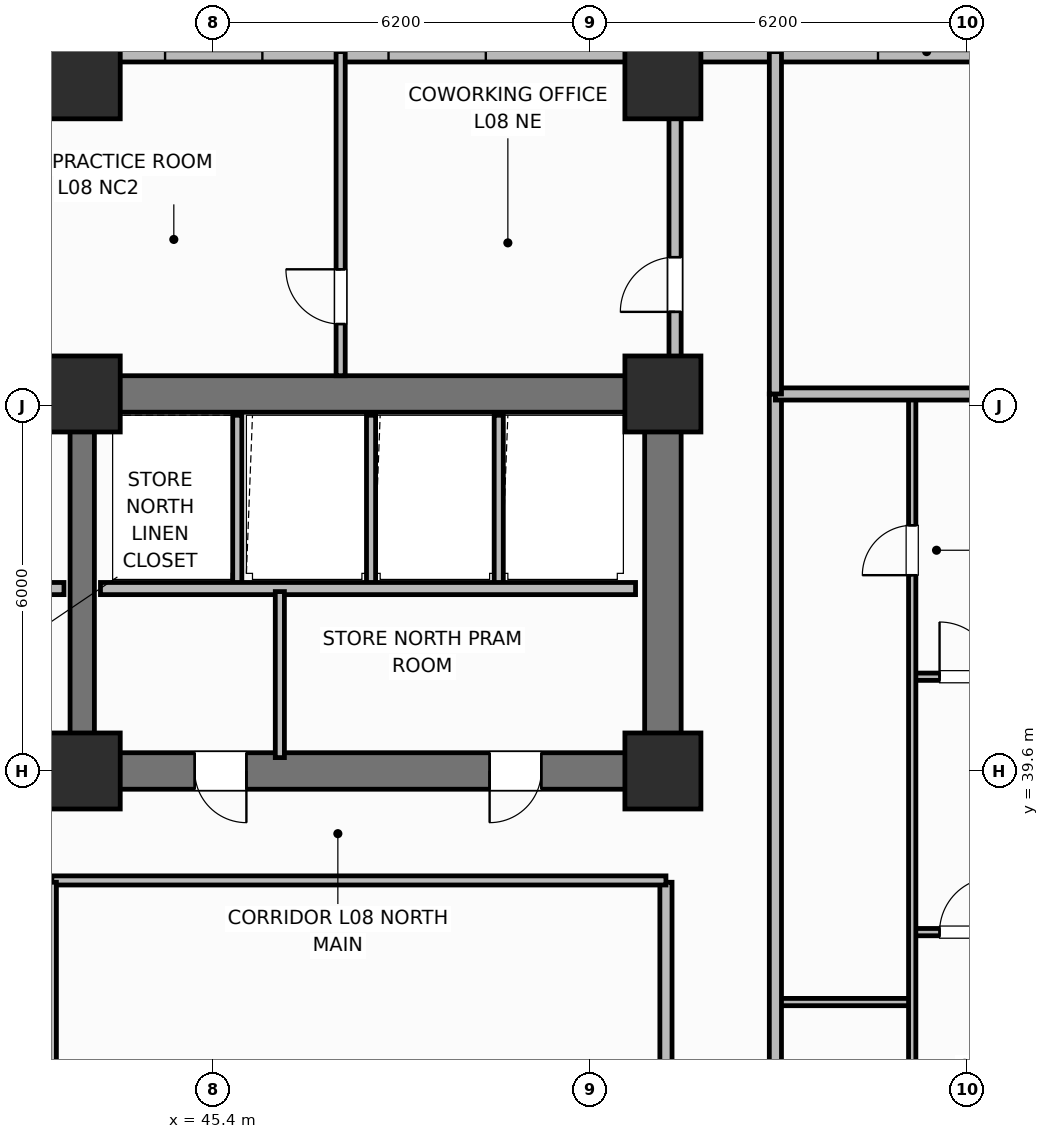
"""IFC4 building model, lengths in metres.
Left out: names, types, materials, properties, quantities, classifications, styles, units other than length and angle.
Written with IfcOpenShell. Run it as: python <this file> out.ifc"""

import sys

from ifc_helpers import new_model, si_unit, direction, frame, frame_2d, origin, origin_2d, place, context, subcontext, project, spatial, rectangle, extrude, element, fill, save


model = new_model("IFC4")
c1 = context("Model", 3, precision=1e-05, world=origin(), true_north=direction((0.0, 1.0)))
c2 = subcontext(c1, "Body", "Model", "MODEL_VIEW")
j1 = project(units=[si_unit("LENGTHUNIT", "METRE"), si_unit("PLANEANGLEUNIT", "RADIAN")], contexts=[c1])
p1 = place(None, origin())
s1 = spatial("IfcSite", under=j1, at=p1, CompositionType="ELEMENT")
p2 = place(p1, origin())
s2 = spatial("IfcBuilding", under=s1, at=p2, CompositionType="ELEMENT")
p3 = place(p2, frame((0.0, 0.0, 36.2)))
s3 = spatial("IfcBuildingStorey", under=s2, at=p3, CompositionType="ELEMENT", Elevation=36.2)
p4 = place(p3, frame((25.6, 45.8, 0.0), z_axis=(0.0, 0.0, 1.0), x_axis=(1.0, 0.0, 0.0)))
e1 = element("IfcWall", 1, at=p4, inside=s3, PredefinedType="SHEAR", context=c2, shape_type="SweptSolid", body=[
    extrude(rectangle(XDim=27.2, YDim=0.6, at=frame_2d((13.6, 0.0))), origin(), (0.0, 0.0, 1.0), 3.7),
])
p5 = place(p3, frame((52.8, 39.9, 0.0), z_axis=(0.0, 0.0, 1.0), x_axis=(0.0, 1.0, 0.0)))
e2 = element("IfcWall", 2, at=p5, inside=s3, PredefinedType="SHEAR", context=c2, shape_type="SweptSolid", body=[
    extrude(rectangle(XDim=5.6, YDim=0.6, at=frame_2d((2.8, 0.0))), origin(), (0.0, 0.0, 1.0), 3.7),
])
p6 = place(p3, frame((52.8, 39.6, 0.0), z_axis=(0.0, 0.0, 1.0), x_axis=(-1.0, 0.0, 0.0)))
e3 = element("IfcWall", 3, at=p6, inside=s3, PredefinedType="SHEAR", context=c2, shape_type="SweptSolid", body=[
    extrude(rectangle(XDim=27.2, YDim=0.6, at=frame_2d((13.6, 0.0))), origin(), (0.0, 0.0, 1.0), 3.7),
])
p7 = place(p6, frame((24.3, 0.0, 0.0)))
e4 = element("IfcOpeningElement", 4, at=p7, cuts=e3, PredefinedType="OPENING", context=c2, shape_type="SweptSolid", body=[
    extrude(rectangle(XDim=1.1, YDim=2.15, at=frame_2d((0.55, 1.075))), frame((0.0, 0.31, 0.0), z_axis=(0.0, -1.0, 0.0), x_axis=(1.0, 0.0, 0.0)), (0.0, 0.0, 1.0), 0.62),
])
p8 = place(p6, frame((21.85, 0.0, 0.0)))
e5 = element("IfcOpeningElement", 5, at=p8, cuts=e3, PredefinedType="OPENING", context=c2, shape_type="SweptSolid", body=[
    extrude(rectangle(XDim=0.85, YDim=2.1, at=frame_2d((0.425, 1.05))), frame((0.0, 0.31, 0.0), z_axis=(0.0, -1.0, 0.0), x_axis=(1.0, 0.0, 0.0)), (0.0, 0.0, 1.0), 0.62),
])
p9 = place(p6, frame((19.85, 0.0, 0.0)))
e6 = element("IfcOpeningElement", 6, at=p9, cuts=e3, PredefinedType="OPENING", context=c2, shape_type="SweptSolid", body=[
    extrude(rectangle(XDim=0.85, YDim=2.1, at=frame_2d((0.425, 1.05))), frame((0.0, 0.31, 0.0), z_axis=(0.0, -1.0, 0.0), x_axis=(1.0, 0.0, 0.0)), (0.0, 0.0, 1.0), 0.62),
])
p10 = place(p6, frame((15.1, 0.0, 0.0)))
e7 = element("IfcOpeningElement", 7, at=p10, cuts=e3, PredefinedType="OPENING", context=c2, shape_type="SweptSolid", body=[
    extrude(rectangle(XDim=1.2, YDim=2.15, at=frame_2d((0.6, 1.075))), frame((0.0, 0.31, 0.0), z_axis=(0.0, -1.0, 0.0), x_axis=(1.0, 0.0, 0.0)), (0.0, 0.0, 1.0), 0.62),
])
p11 = place(p6, frame((12.6, 0.0, 0.0)))
e8 = element("IfcOpeningElement", 8, at=p11, cuts=e3, PredefinedType="OPENING", context=c2, shape_type="SweptSolid", body=[
    extrude(rectangle(XDim=0.85, YDim=2.1, at=frame_2d((0.425, 1.05))), frame((0.0, 0.31, 0.0), z_axis=(0.0, -1.0, 0.0), x_axis=(1.0, 0.0, 0.0)), (0.0, 0.0, 1.0), 0.62),
])
p12 = place(p6, frame((10.85, 0.0, 0.0)))
e9 = element("IfcOpeningElement", 9, at=p12, cuts=e3, PredefinedType="OPENING", context=c2, shape_type="SweptSolid", body=[
    extrude(rectangle(XDim=0.85, YDim=2.1, at=frame_2d((0.425, 1.05))), frame((0.0, 0.31, 0.0), z_axis=(0.0, -1.0, 0.0), x_axis=(1.0, 0.0, 0.0)), (0.0, 0.0, 1.0), 0.62),
])
p13 = place(p6, frame((6.85, 0.0, 0.0)))
e10 = element("IfcOpeningElement", 10, at=p13, cuts=e3, PredefinedType="OPENING", context=c2, shape_type="SweptSolid", body=[
    extrude(rectangle(XDim=0.85, YDim=2.1, at=frame_2d((0.425, 1.05))), frame((0.0, 0.31, 0.0), z_axis=(0.0, -1.0, 0.0), x_axis=(1.0, 0.0, 0.0)), (0.0, 0.0, 1.0), 0.62),
])
p14 = place(p6, frame((2.0, 0.0, 0.0)))
e11 = element("IfcOpeningElement", 11, at=p14, cuts=e3, PredefinedType="OPENING", context=c2, shape_type="SweptSolid", body=[
    extrude(rectangle(XDim=0.85, YDim=2.1, at=frame_2d((0.425, 1.05))), frame((0.0, 0.31, 0.0), z_axis=(0.0, -1.0, 0.0), x_axis=(1.0, 0.0, 0.0)), (0.0, 0.0, 1.0), 0.62),
])
p15 = place(p3, frame((43.25, 39.9, 0.0), z_axis=(0.0, 0.0, 1.0), x_axis=(0.0, 1.0, 0.0)))
e12 = element("IfcWall", 12, at=p15, inside=s3, PredefinedType="SHEAR", context=c2, shape_type="SweptSolid", body=[
    extrude(rectangle(XDim=5.6, YDim=0.4, at=frame_2d((2.8, 0.0))), origin(), (0.0, 0.0, 1.0), 3.7),
])
for number, where, z_axis, x_axis in (
    (13, (43.25, 39.6, 0.0), (0.0, 0.0, 1.0), (1.0, 0.0, 0.0)),
    (14, (43.25, 45.8, 0.0), (0.0, 0.0, 1.0), (1.0, 0.0, 0.0)),
    (15, (52.8, 39.6, 0.0), (0.0, 0.0, 1.0), (1.0, 0.0, 0.0)),
    (16, (52.8, 45.8, 0.0), (0.0, 0.0, 1.0), (1.0, 0.0, 0.0)),
    (17, (43.25, 50.95, 0.0), (0.0, 0.0, 1.0), (1.0, 0.0, 0.0)),
    (18, (52.8, 50.95, 0.0), (0.0, 0.0, 1.0), (1.0, 0.0, 0.0)),
):
    element("IfcColumn", number, at=place(p3, frame(where, z_axis=z_axis, x_axis=x_axis)), inside=s3, PredefinedType="COLUMN", context=c2, shape_type="SweptSolid", body=[
        extrude(rectangle(XDim=1.25, YDim=1.25, at=origin_2d()), origin(), (0.0, 0.0, 1.0), 3.7),
    ])
p16 = place(p3, frame((59.8, 51.43, 0.0), z_axis=(0.0, 0.0, 1.0), x_axis=(-1.0, 0.0, 0.0)))
e19 = element("IfcWall", 19, at=p16, inside=s3, PredefinedType="SOLIDWALL", context=c2, shape_type="SweptSolid", body=[
    extrude(rectangle(XDim=17.4, YDim=0.34, at=frame_2d((8.7, 0.0))), origin(), (0.0, 0.0, 1.0), 2.7),
])
p17 = place(p16, frame((1.863, 0.0, 0.68)))
e20 = element("IfcOpeningElement", 20, at=p17, cuts=e19, PredefinedType="OPENING", context=c2, shape_type="SweptSolid", body=[
    extrude(rectangle(XDim=1.6, YDim=1.9, at=frame_2d((0.8, 0.95))), frame((0.0, 0.18, 0.0), z_axis=(0.0, -1.0, 0.0), x_axis=(1.0, 0.0, 0.0)), (0.0, 0.0, 1.0), 0.36),
])
p18 = place(p16, frame((9.913, 0.0, 0.68)))
e21 = element("IfcOpeningElement", 21, at=p18, cuts=e19, PredefinedType="OPENING", context=c2, shape_type="SweptSolid", body=[
    extrude(rectangle(XDim=1.6, YDim=1.9, at=frame_2d((0.8, 0.95))), frame((0.0, 0.18, 0.0), z_axis=(0.0, -1.0, 0.0), x_axis=(1.0, 0.0, 0.0)), (0.0, 0.0, 1.0), 0.36),
])
p19 = place(p16, frame((13.587, 0.0, 0.68)))
e22 = element("IfcOpeningElement", 22, at=p19, cuts=e19, PredefinedType="OPENING", context=c2, shape_type="SweptSolid", body=[
    extrude(rectangle(XDim=1.6, YDim=1.9, at=frame_2d((0.8, 0.95))), frame((0.0, 0.18, 0.0), z_axis=(0.0, -1.0, 0.0), x_axis=(1.0, 0.0, 0.0)), (0.0, 0.0, 1.0), 0.36),
])
p20 = place(p3, frame((42.95, 42.6, 0.0), z_axis=(0.0, 0.0, 1.0), x_axis=(-1.0, 0.0, 0.0)))
e23 = element("IfcWall", 23, at=p20, inside=s3, PredefinedType="PARTITIONING", context=c2, shape_type="SweptSolid", body=[
    extrude(rectangle(XDim=4.6, YDim=0.2, at=frame_2d((2.3, 0.0))), origin(), (0.0, 0.0, 1.0), 2.3),
])
for number, where, z_axis, x_axis in (
    (24, (45.8, 42.65, 0.0), (0.0, 0.0, 1.0), (0.0, 1.0, 0.0)),
    (25, (48.0, 42.65, 0.0), (0.0, 0.0, 1.0), (0.0, 1.0, 0.0)),
    (26, (50.1, 42.65, 0.0), (0.0, 0.0, 1.0), (0.0, 1.0, 0.0)),
):
    element("IfcWall", number, at=place(p3, frame(where, z_axis=z_axis, x_axis=x_axis)), inside=s3, PredefinedType="PARTITIONING", context=c2, shape_type="SweptSolid", body=[
        extrude(rectangle(XDim=2.8, YDim=0.15, at=frame_2d((1.4, 0.0))), origin(), (0.0, 0.0, 1.0), 2.53),
    ])
p21 = place(p3, frame((52.35, 42.6, 0.0), z_axis=(0.0, 0.0, 1.0), x_axis=(-1.0, 0.0, 0.0)))
e27 = element("IfcWall", 27, at=p21, inside=s3, PredefinedType="PARTITIONING", context=c2, shape_type="SweptSolid", body=[
    extrude(rectangle(XDim=8.8, YDim=0.2, at=frame_2d((4.4, 0.0))), origin(), (0.0, 0.0, 1.0), 2.53),
])
p22 = place(p3, frame((46.5, 39.82, 0.0), z_axis=(0.0, 0.0, 1.0), x_axis=(0.0, 1.0, 0.0)))
e28 = element("IfcWall", 28, at=p22, inside=s3, PredefinedType="PARTITIONING", context=c2, shape_type="SweptSolid", body=[
    extrude(rectangle(XDim=2.73, YDim=0.15, at=frame_2d((1.365, 0.0))), origin(), (0.0, 0.0, 1.0), 2.53),
])
p23 = place(p3, frame((52.85, 18.63, 0.0), z_axis=(0.0, 0.0, 1.0), x_axis=(0.0, 1.0, 0.0)))
e29 = element("IfcWall", 29, at=p23, inside=s3, PredefinedType="PARTITIONING", context=c2, shape_type="SweptSolid", body=[
    extrude(rectangle(XDim=19.14, YDim=0.2, at=frame_2d((9.57, 0.0))), origin(), (0.0, 0.0, 1.0), 2.53),
])
p24 = place(p3, frame((42.75, 37.8, 0.0), z_axis=(0.0, 0.0, 1.0), x_axis=(1.0, 0.0, 0.0)))
e30 = element("IfcWall", 30, at=p24, inside=s3, PredefinedType="PARTITIONING", context=c2, shape_type="SweptSolid", body=[
    extrude(rectangle(XDim=10.1, YDim=0.15, at=frame_2d((5.05, 0.0))), origin(), (0.0, 0.0, 1.0), 2.53),
])
p25 = place(p3, frame((42.75, 18.63, 0.0), z_axis=(0.0, 0.0, 1.0), x_axis=(0.0, 1.0, 0.0)))
e31 = element("IfcWall", 31, at=p25, inside=s3, PredefinedType="PARTITIONING", context=c2, shape_type="SweptSolid", body=[
    extrude(rectangle(XDim=19.14, YDim=0.15, at=frame_2d((9.57, 0.0))), origin(), (0.0, 0.0, 1.0), 2.53),
])
p26 = place(p25, frame((5.5, 0.0, 0.0)))
e32 = element("IfcOpeningElement", 32, at=p26, cuts=e31, PredefinedType="OPENING", context=c2, shape_type="SweptSolid", body=[
    extrude(rectangle(XDim=1.0, YDim=2.15, at=frame_2d((0.5, 1.075))), frame((0.0, 0.085, 0.0), z_axis=(0.0, -1.0, 0.0), x_axis=(1.0, 0.0, 0.0)), (0.0, 0.0, 1.0), 0.17),
])
p27 = place(p3, frame((54.65, 35.8, 0.0), z_axis=(0.0, 0.0, 1.0), x_axis=(1.0, 0.0, 0.0)))
e33 = element("IfcWall", 33, at=p27, inside=s3, PredefinedType="PARTITIONING", context=c2, shape_type="SweptSolid", body=[
    extrude(rectangle(XDim=2.25, YDim=0.12, at=frame_2d((1.125, 0.0))), origin(), (0.0, 0.0, 1.0), 2.53),
])
p28 = place(p3, frame((56.9, 36.95, 0.0), z_axis=(0.0, 0.0, 1.0), x_axis=(1.0, 0.0, 0.0)))
e34 = element("IfcWall", 34, at=p28, inside=s3, PredefinedType="PARTITIONING", context=c2, shape_type="SweptSolid", body=[
    extrude(rectangle(XDim=6.93, YDim=0.12, at=frame_2d((3.465, 0.0))), origin(), (0.0, 0.0, 1.0), 2.53),
])
p29 = place(p28, frame((0.45, 0.0, 0.0)))
e35 = element("IfcOpeningElement", 35, at=p29, cuts=e34, PredefinedType="OPENING", context=c2, shape_type="SweptSolid", body=[
    extrude(rectangle(XDim=0.9, YDim=2.1, at=frame_2d((0.45, 1.05))), frame((0.0, 0.07, 0.0), z_axis=(0.0, -1.0, 0.0), x_axis=(1.0, 0.0, 0.0)), (0.0, 0.0, 1.0), 0.14),
])
p30 = place(p3, frame((56.9, 41.15, 0.0), z_axis=(0.0, 0.0, 1.0), x_axis=(1.0, 0.0, 0.0)))
e36 = element("IfcWall", 36, at=p30, inside=s3, PredefinedType="PARTITIONING", context=c2, shape_type="SweptSolid", body=[
    extrude(rectangle(XDim=6.93, YDim=0.12, at=frame_2d((3.465, 0.0))), origin(), (0.0, 0.0, 1.0), 2.53),
])
p31 = place(p30, frame((0.45, 0.0, 0.0)))
e37 = element("IfcOpeningElement", 37, at=p31, cuts=e36, PredefinedType="OPENING", context=c2, shape_type="SweptSolid", body=[
    extrude(rectangle(XDim=0.9, YDim=2.1, at=frame_2d((0.45, 1.05))), frame((0.0, 0.07, 0.0), z_axis=(0.0, -1.0, 0.0), x_axis=(1.0, 0.0, 0.0)), (0.0, 0.0, 1.0), 0.14),
])
p32 = place(p3, frame((56.9, 26.64, 0.0), z_axis=(0.0, 0.0, 1.0), x_axis=(0.0, 1.0, 0.0)))
e38 = element("IfcWall", 38, at=p32, inside=s3, PredefinedType="PARTITIONING", context=c2, shape_type="SweptSolid", body=[
    extrude(rectangle(XDim=19.12, YDim=0.12, at=frame_2d((9.56, 0.0))), origin(), (0.0, 0.0, 1.0), 2.53),
])
p33 = place(p32, frame((2.81, 0.0, 0.0)))
e39 = element("IfcOpeningElement", 39, at=p33, cuts=e38, PredefinedType="OPENING", context=c2, shape_type="SweptSolid", body=[
    extrude(rectangle(XDim=0.9, YDim=2.1, at=frame_2d((0.45, 1.05))), frame((0.0, 0.07, 0.0), z_axis=(0.0, -1.0, 0.0), x_axis=(1.0, 0.0, 0.0)), (0.0, 0.0, 1.0), 0.14),
])
p34 = place(p32, frame((16.18, 0.0, 0.0)))
e40 = element("IfcOpeningElement", 40, at=p34, cuts=e38, PredefinedType="OPENING", context=c2, shape_type="SweptSolid", body=[
    extrude(rectangle(XDim=0.82, YDim=2.08, at=frame_2d((0.41, 1.04))), frame((0.0, 0.07, 0.0), z_axis=(0.0, -1.0, 0.0), x_axis=(1.0, 0.0, 0.0)), (0.0, 0.0, 1.0), 0.14),
])
p35 = place(p3, frame((54.65, 10.6, 0.0), z_axis=(0.0, 0.0, 1.0), x_axis=(0.0, 1.0, 0.0)))
e41 = element("IfcWall", 41, at=p35, inside=s3, PredefinedType="PARTITIONING", context=c2, shape_type="SweptSolid", body=[
    extrude(rectangle(XDim=35.2, YDim=0.2, at=frame_2d((17.6, 0.0))), origin(), (0.0, 0.0, 1.0), 2.53),
])
p36 = place(p35, frame((2.65, 0.0, 0.0)))
e42 = element("IfcOpeningElement", 42, at=p36, cuts=e41, PredefinedType="OPENING", context=c2, shape_type="SweptSolid", body=[
    extrude(rectangle(XDim=1.0, YDim=2.15, at=frame_2d((0.5, 1.075))), frame((0.0, 0.11, 0.0), z_axis=(0.0, -1.0, 0.0), x_axis=(1.0, 0.0, 0.0)), (0.0, 0.0, 1.0), 0.22),
])
p37 = place(p35, frame((19.95, 0.0, 0.0)))
e43 = element("IfcOpeningElement", 43, at=p37, cuts=e41, PredefinedType="OPENING", context=c2, shape_type="SweptSolid", body=[
    extrude(rectangle(XDim=1.0, YDim=2.15, at=frame_2d((0.5, 1.075))), frame((0.0, 0.11, 0.0), z_axis=(0.0, -1.0, 0.0), x_axis=(1.0, 0.0, 0.0)), (0.0, 0.0, 1.0), 0.22),
])
p38 = place(p3, frame((54.65, 45.8, 0.0), z_axis=(0.0, 0.0, 1.0), x_axis=(1.0, 0.0, 0.0)))
e44 = element("IfcWall", 44, at=p38, inside=s3, PredefinedType="PARTITIONING", context=c2, shape_type="SweptSolid", body=[
    extrude(rectangle(XDim=8.76, YDim=0.2, at=frame_2d((4.38, 0.0))), origin(), (0.0, 0.0, 1.0), 2.53),
])
p39 = place(p3, frame((54.65, 45.8, 0.0), z_axis=(0.0, 0.0, 1.0), x_axis=(0.0, 1.0, 0.0)))
e45 = element("IfcWall", 45, at=p39, inside=s3, PredefinedType="PARTITIONING", context=c2, shape_type="SweptSolid", body=[
    extrude(rectangle(XDim=5.63, YDim=0.2, at=frame_2d((2.815, 0.0))), origin(), (0.0, 0.0, 1.0), 2.53),
])
p40 = place(p3, frame((47.5, 46.1, 0.0), z_axis=(0.0, 0.0, 1.0), x_axis=(0.0, 1.0, 0.0)))
e46 = element("IfcWall", 46, at=p40, inside=s3, PredefinedType="PARTITIONING", context=c2, shape_type="SweptSolid", body=[
    extrude(rectangle(XDim=5.33, YDim=0.15, at=frame_2d((2.665, 0.0))), origin(), (0.0, 0.0, 1.0), 2.53),
])
p41 = place(p40, frame((0.85, 0.0, 0.0)))
e47 = element("IfcOpeningElement", 47, at=p41, cuts=e46, PredefinedType="OPENING", context=c2, shape_type="SweptSolid", body=[
    extrude(rectangle(XDim=0.9, YDim=2.1, at=frame_2d((0.45, 1.05))), frame((0.0, 0.085, 0.0), z_axis=(0.0, -1.0, 0.0), x_axis=(1.0, 0.0, 0.0)), (0.0, 0.0, 1.0), 0.17),
])
p42 = place(p3, frame((53.0, 46.1, 0.0), z_axis=(0.0, 0.0, 1.0), x_axis=(0.0, 1.0, 0.0)))
e48 = element("IfcWall", 48, at=p42, inside=s3, PredefinedType="PARTITIONING", context=c2, shape_type="SweptSolid", body=[
    extrude(rectangle(XDim=4.38, YDim=0.2, at=frame_2d((2.19, 0.0))), origin(), (0.0, 0.0, 1.0), 2.53),
])
p43 = place(p42, frame((1.05, 0.0, 0.0)))
e49 = element("IfcOpeningElement", 49, at=p43, cuts=e48, PredefinedType="OPENING", context=c2, shape_type="SweptSolid", body=[
    extrude(rectangle(XDim=0.9, YDim=2.1, at=frame_2d((0.45, 1.05))), frame((0.0, 0.11, 0.0), z_axis=(0.0, -1.0, 0.0), x_axis=(1.0, 0.0, 0.0)), (0.0, 0.0, 1.0), 0.22),
])
p44 = place(p17, origin())
e50 = element("IfcWindow", 50, at=p44, inside=s3, PartitioningType="SINGLE_PANEL", PredefinedType="WINDOW", context=c2, shape_type="SweptSolid", body=[
    extrude(rectangle(XDim=1.6, YDim=1.9, at=frame_2d((0.8, 0.95))), frame((0.0, 0.03, 0.0), z_axis=(0.0, -1.0, 0.0), x_axis=(1.0, 0.0, 0.0)), (0.0, 0.0, 1.0), 0.06),
])
fill(e20, e50)
p45 = place(p18, origin())
e51 = element("IfcWindow", 51, at=p45, inside=s3, PartitioningType="SINGLE_PANEL", PredefinedType="WINDOW", context=c2, shape_type="SweptSolid", body=[
    extrude(rectangle(XDim=1.6, YDim=1.9, at=frame_2d((0.8, 0.95))), frame((0.0, 0.03, 0.0), z_axis=(0.0, -1.0, 0.0), x_axis=(1.0, 0.0, 0.0)), (0.0, 0.0, 1.0), 0.06),
])
fill(e21, e51)
p46 = place(p19, origin())
e52 = element("IfcWindow", 52, at=p46, inside=s3, PartitioningType="SINGLE_PANEL", PredefinedType="WINDOW", context=c2, shape_type="SweptSolid", body=[
    extrude(rectangle(XDim=1.6, YDim=1.9, at=frame_2d((0.8, 0.95))), frame((0.0, 0.03, 0.0), z_axis=(0.0, -1.0, 0.0), x_axis=(1.0, 0.0, 0.0)), (0.0, 0.0, 1.0), 0.06),
])
fill(e22, e52)
p47 = place(p29, origin())
e53 = element("IfcDoor", 53, at=p47, inside=s3, OperationType="SINGLE_SWING_RIGHT", PredefinedType="DOOR", context=c2, shape_type="SweptSolid", body=[
    extrude(rectangle(XDim=0.9, YDim=2.1, at=frame_2d((0.45, 1.05))), frame((0.0, 0.025, 0.0), z_axis=(0.0, -1.0, 0.0), x_axis=(1.0, 0.0, 0.0)), (0.0, 0.0, 1.0), 0.05),
])
fill(e35, e53)
p48 = place(p31, origin())
e54 = element("IfcDoor", 54, at=p48, inside=s3, OperationType="SINGLE_SWING_LEFT", PredefinedType="DOOR", context=c2, shape_type="SweptSolid", body=[
    extrude(rectangle(XDim=0.9, YDim=2.1, at=frame_2d((0.45, 1.05))), frame((0.0, 0.025, 0.0), z_axis=(0.0, -1.0, 0.0), x_axis=(1.0, 0.0, 0.0)), (0.0, 0.0, 1.0), 0.05),
])
fill(e37, e54)
p49 = place(p34, origin())
e55 = element("IfcDoor", 55, at=p49, inside=s3, OperationType="SINGLE_SWING_LEFT", PredefinedType="DOOR", context=c2, shape_type="SweptSolid", body=[
    extrude(rectangle(XDim=0.82, YDim=2.08, at=frame_2d((0.41, 1.04))), frame((0.0, 0.025, 0.0), z_axis=(0.0, -1.0, 0.0), x_axis=(1.0, 0.0, 0.0)), (0.0, 0.0, 1.0), 0.05),
])
fill(e40, e55)
p50 = place(p41, origin())
e56 = element("IfcDoor", 56, at=p50, inside=s3, OperationType="SINGLE_SWING_RIGHT", PredefinedType="DOOR", context=c2, shape_type="SweptSolid", body=[
    extrude(rectangle(XDim=0.9, YDim=2.1, at=frame_2d((0.45, 1.05))), frame((0.0, 0.025, 0.0), z_axis=(0.0, -1.0, 0.0), x_axis=(1.0, 0.0, 0.0)), (0.0, 0.0, 1.0), 0.05),
])
fill(e47, e56)
p51 = place(p43, origin())
e57 = element("IfcDoor", 57, at=p51, inside=s3, OperationType="SINGLE_SWING_LEFT", PredefinedType="DOOR", context=c2, shape_type="SweptSolid", body=[
    extrude(rectangle(XDim=0.9, YDim=2.1, at=frame_2d((0.45, 1.05))), frame((0.0, 0.025, 0.0), z_axis=(0.0, -1.0, 0.0), x_axis=(1.0, 0.0, 0.0)), (0.0, 0.0, 1.0), 0.05),
])
fill(e49, e57)
p52 = place(p13, origin())
e58 = element("IfcDoor", 58, at=p52, inside=s3, OperationType="SINGLE_SWING_LEFT", PredefinedType="DOOR", context=c2, shape_type="SweptSolid", body=[
    extrude(rectangle(XDim=0.85, YDim=2.1, at=frame_2d((0.425, 1.05))), frame((0.0, 0.025, 0.0), z_axis=(0.0, -1.0, 0.0), x_axis=(1.0, 0.0, 0.0)), (0.0, 0.0, 1.0), 0.05),
])
fill(e10, e58)
p53 = place(p14, origin())
e59 = element("IfcDoor", 59, at=p53, inside=s3, OperationType="SINGLE_SWING_RIGHT", PredefinedType="DOOR", context=c2, shape_type="SweptSolid", body=[
    extrude(rectangle(XDim=0.85, YDim=2.1, at=frame_2d((0.425, 1.05))), frame((0.0, 0.025, 0.0), z_axis=(0.0, -1.0, 0.0), x_axis=(1.0, 0.0, 0.0)), (0.0, 0.0, 1.0), 0.05),
])
fill(e11, e59)
save(model, sys.argv[1])
